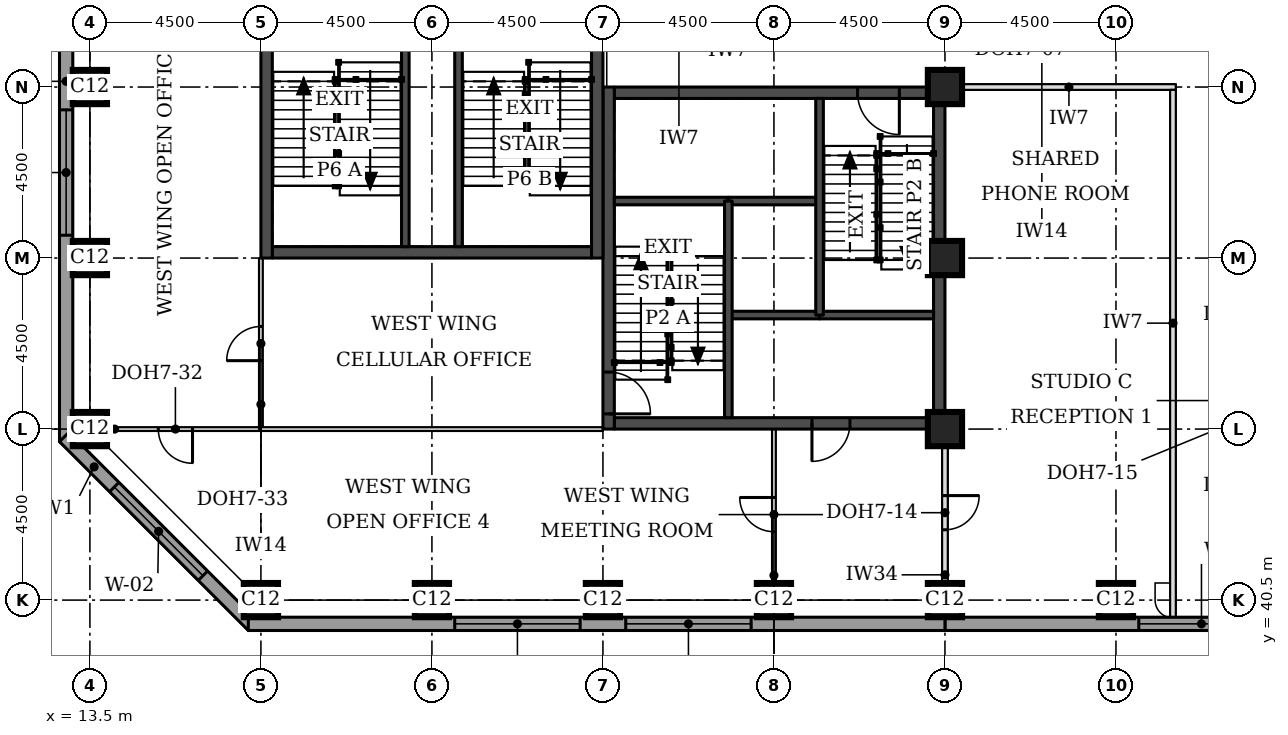
"""IFC4 building model, lengths in metres.
Left out: names, types, materials, properties, quantities, classifications, styles, units other than length and angle.
Written with IfcOpenShell. Run it as: python <this file> out.ifc"""

import sys

from ifc_helpers import new_model, si_unit, direction, frame, frame_2d, origin, origin_2d, place, context, subcontext, project, spatial, rectangle, extrude, element, fill, save


model = new_model("IFC4")
c1 = context("Model", 3, precision=1e-05, world=origin(), true_north=direction((0.0, 1.0)))
c2 = subcontext(c1, "Body", "Model", "MODEL_VIEW")
j1 = project(units=[si_unit("LENGTHUNIT", "METRE"), si_unit("PLANEANGLEUNIT", "RADIAN")], contexts=[c1])
p1 = place(None, origin())
s1 = spatial("IfcSite", under=j1, at=p1, CompositionType="ELEMENT")
p2 = place(p1, origin())
s2 = spatial("IfcBuilding", under=s1, at=p2, CompositionType="ELEMENT")
p3 = place(p2, frame((0.0, 0.0, 192.1)))
s3 = spatial("IfcBuildingStorey", under=s2, at=p3, CompositionType="ELEMENT", Elevation=192.1)
for number, where, z_axis, x_axis in (
    (1, (18.0, 40.5, 0.0), (0.0, 0.0, 1.0), (1.0, 0.0, 0.0)),
    (2, (22.5, 40.5, 0.0), (0.0, 0.0, 1.0), (1.0, 0.0, 0.0)),
    (3, (27.0, 40.5, 0.0), (0.0, 0.0, 1.0), (1.0, 0.0, 0.0)),
    (4, (31.5, 40.5, 0.0), (0.0, 0.0, 1.0), (1.0, 0.0, 0.0)),
    (5, (36.0, 40.5, 0.0), (0.0, 0.0, 1.0), (1.0, 0.0, 0.0)),
    (6, (40.5, 40.5, 0.0), (0.0, 0.0, 1.0), (1.0, 0.0, 0.0)),
    (7, (13.5, 45.0, 0.0), (0.0, 0.0, 1.0), (1.0, 0.0, 0.0)),
    (8, (36.0, 45.0, 0.0), (0.0, 0.0, 1.0), (1.0, 0.0, 0.0)),
    (9, (13.5, 49.5, 0.0), (0.0, 0.0, 1.0), (1.0, 0.0, 0.0)),
    (10, (36.0, 49.5, 0.0), (0.0, 0.0, 1.0), (1.0, 0.0, 0.0)),
    (11, (13.5, 54.0, 0.0), (0.0, 0.0, 1.0), (1.0, 0.0, 0.0)),
    (12, (36.0, 54.0, 0.0), (0.0, 0.0, 1.0), (1.0, 0.0, 0.0)),
):
    element("IfcColumn", number, at=place(p3, frame(where, z_axis=z_axis, x_axis=x_axis)), inside=s3, PredefinedType="COLUMN", context=c2, shape_type="SweptSolid", body=[
        extrude(rectangle(XDim=0.9, YDim=0.9, at=origin_2d()), origin(), (0.0, 0.0, 1.0), 3.7),
    ])
p4 = place(p3, frame((27.3, 45.15, 0.0), z_axis=(0.0, 0.0, 1.0), x_axis=(1.0, 0.0, 0.0)))
e13 = element("IfcWall", 13, at=p4, inside=s3, PredefinedType="SHEAR", context=c2, shape_type="SweptSolid", body=[
    extrude(rectangle(XDim=8.4, YDim=0.3, at=frame_2d((4.2, 0.0))), origin(), (0.0, 0.0, 1.0), 3.7),
])
p5 = place(p4, frame((5.2, 0.0, 0.0)))
e14 = element("IfcOpeningElement", 14, at=p5, cuts=e13, PredefinedType="OPENING", context=c2, shape_type="SweptSolid", body=[
    extrude(rectangle(XDim=1.0, YDim=2.1, at=frame_2d((0.5, 1.05))), frame((0.0, 0.16, 0.0), z_axis=(0.0, -1.0, 0.0), x_axis=(1.0, 0.0, 0.0)), (0.0, 0.0, 1.0), 0.32),
])
p6 = place(p3, frame((27.3, 53.85, 0.0), z_axis=(0.0, 0.0, 1.0), x_axis=(1.0, 0.0, 0.0)))
e15 = element("IfcWall", 15, at=p6, inside=s3, PredefinedType="SHEAR", context=c2, shape_type="SweptSolid", body=[
    extrude(rectangle(XDim=8.4, YDim=0.3, at=frame_2d((4.2, 0.0))), origin(), (0.0, 0.0, 1.0), 3.7),
])
p7 = place(p6, frame((6.4, 0.0, 0.0)))
e16 = element("IfcOpeningElement", 16, at=p7, cuts=e15, PredefinedType="OPENING", context=c2, shape_type="SweptSolid", body=[
    extrude(rectangle(XDim=1.1, YDim=2.1, at=frame_2d((0.55, 1.05))), frame((0.0, 0.16, 0.0), z_axis=(0.0, -1.0, 0.0), x_axis=(1.0, 0.0, 0.0)), (0.0, 0.0, 1.0), 0.32),
])
p8 = place(p3, frame((27.15, 45.0, 0.0), z_axis=(0.0, 0.0, 1.0), x_axis=(0.0, 1.0, 0.0)))
e17 = element("IfcWall", 17, at=p8, inside=s3, PredefinedType="SHEAR", context=c2, shape_type="SweptSolid", body=[
    extrude(rectangle(XDim=9.0, YDim=0.3, at=frame_2d((4.5, 0.0))), origin(), (0.0, 0.0, 1.0), 3.7),
])
p9 = place(p8, frame((0.4, 0.0, 0.0)))
e18 = element("IfcOpeningElement", 18, at=p9, cuts=e17, PredefinedType="OPENING", context=c2, shape_type="SweptSolid", body=[
    extrude(rectangle(XDim=1.1, YDim=2.1, at=frame_2d((0.55, 1.05))), frame((0.0, 0.16, 0.0), z_axis=(0.0, -1.0, 0.0), x_axis=(1.0, 0.0, 0.0)), (0.0, 0.0, 1.0), 0.32),
])
p10 = place(p3, frame((35.85, 45.0, 0.0), z_axis=(0.0, 0.0, 1.0), x_axis=(0.0, 1.0, 0.0)))
e19 = element("IfcWall", 19, at=p10, inside=s3, PredefinedType="SHEAR", context=c2, shape_type="SweptSolid", body=[
    extrude(rectangle(XDim=9.0, YDim=0.3, at=frame_2d((4.5, 0.0))), origin(), (0.0, 0.0, 1.0), 3.7),
])
p11 = place(p3, frame((18.3, 49.65, 0.0), z_axis=(0.0, 0.0, 1.0), x_axis=(1.0, 0.0, 0.0)))
e20 = element("IfcWall", 20, at=p11, inside=s3, PredefinedType="SHEAR", context=c2, shape_type="SweptSolid", body=[
    extrude(rectangle(XDim=8.4, YDim=0.3, at=frame_2d((4.2, 0.0))), origin(), (0.0, 0.0, 1.0), 3.7),
])
p12 = place(p3, frame((18.15, 49.5, 0.0), z_axis=(0.0, 0.0, 1.0), x_axis=(0.0, 1.0, 0.0)))
e21 = element("IfcWall", 21, at=p12, inside=s3, PredefinedType="SHEAR", context=c2, shape_type="SweptSolid", body=[
    extrude(rectangle(XDim=9.0, YDim=0.3, at=frame_2d((4.5, 0.0))), origin(), (0.0, 0.0, 1.0), 3.7),
])
p13 = place(p3, frame((26.85, 49.5, 0.0), z_axis=(0.0, 0.0, 1.0), x_axis=(0.0, 1.0, 0.0)))
e22 = element("IfcWall", 22, at=p13, inside=s3, PredefinedType="SHEAR", context=c2, shape_type="SweptSolid", body=[
    extrude(rectangle(XDim=9.0, YDim=0.3, at=frame_2d((4.5, 0.0))), origin(), (0.0, 0.0, 1.0), 3.7),
])
p14 = place(p13, frame((6.6, 0.0, 0.0)))
e23 = element("IfcOpeningElement", 23, at=p14, cuts=e22, PredefinedType="OPENING", context=c2, shape_type="SweptSolid", body=[
    extrude(rectangle(XDim=1.8, YDim=2.1, at=frame_2d((0.9, 1.05))), frame((0.0, 0.16, 0.0), z_axis=(0.0, -1.0, 0.0), x_axis=(1.0, 0.0, 0.0)), (0.0, 0.0, 1.0), 0.32),
])
p15 = place(p3, frame((36.0, 39.875, 0.0), z_axis=(0.0, 0.0, 1.0), x_axis=(1.0, 0.0, 0.0)))
e24 = element("IfcWall", 24, at=p15, inside=s3, PredefinedType="STANDARD", context=c2, shape_type="SweptSolid", body=[
    extrude(rectangle(XDim=36.331, YDim=0.35, at=frame_2d((18.166, 0.0))), origin(), (0.0, 0.0, 1.0), 3.525),
])
p16 = place(p15, frame((5.1, 0.0, 0.9)))
e25 = element("IfcOpeningElement", 25, at=p16, cuts=e24, PredefinedType="OPENING", context=c2, shape_type="SweptSolid", body=[
    extrude(rectangle(XDim=3.3, YDim=1.9, at=frame_2d((1.65, 0.95))), frame((0.0, 0.185, 0.0), z_axis=(0.0, -1.0, 0.0), x_axis=(1.0, 0.0, 0.0)), (0.0, 0.0, 1.0), 0.37),
])
p17 = place(p15, frame((9.6, 0.0, 0.9)))
e26 = element("IfcOpeningElement", 26, at=p17, cuts=e24, PredefinedType="OPENING", context=c2, shape_type="SweptSolid", body=[
    extrude(rectangle(XDim=3.3, YDim=1.9, at=frame_2d((1.65, 0.95))), frame((0.0, 0.185, 0.0), z_axis=(0.0, -1.0, 0.0), x_axis=(1.0, 0.0, 0.0)), (0.0, 0.0, 1.0), 0.37),
])
p18 = place(p15, frame((14.1, 0.0, 0.9)))
e27 = element("IfcOpeningElement", 27, at=p18, cuts=e24, PredefinedType="OPENING", context=c2, shape_type="SweptSolid", body=[
    extrude(rectangle(XDim=3.3, YDim=1.9, at=frame_2d((1.65, 0.95))), frame((0.0, 0.185, 0.0), z_axis=(0.0, -1.0, 0.0), x_axis=(1.0, 0.0, 0.0)), (0.0, 0.0, 1.0), 0.37),
])
p19 = place(p15, frame((18.6, 0.0, 0.9)))
e28 = element("IfcOpeningElement", 28, at=p19, cuts=e24, PredefinedType="OPENING", context=c2, shape_type="SweptSolid", body=[
    extrude(rectangle(XDim=3.3, YDim=1.9, at=frame_2d((1.65, 0.95))), frame((0.0, 0.185, 0.0), z_axis=(0.0, -1.0, 0.0), x_axis=(1.0, 0.0, 0.0)), (0.0, 0.0, 1.0), 0.37),
])
p20 = place(p15, frame((23.1, 0.0, 0.9)))
e29 = element("IfcOpeningElement", 29, at=p20, cuts=e24, PredefinedType="OPENING", context=c2, shape_type="SweptSolid", body=[
    extrude(rectangle(XDim=3.3, YDim=1.9, at=frame_2d((1.65, 0.95))), frame((0.0, 0.185, 0.0), z_axis=(0.0, -1.0, 0.0), x_axis=(1.0, 0.0, 0.0)), (0.0, 0.0, 1.0), 0.37),
])
p21 = place(p15, frame((27.6, 0.0, 0.9)))
e30 = element("IfcOpeningElement", 30, at=p21, cuts=e24, PredefinedType="OPENING", context=c2, shape_type="SweptSolid", body=[
    extrude(rectangle(XDim=3.3, YDim=1.9, at=frame_2d((1.65, 0.95))), frame((0.0, 0.185, 0.0), z_axis=(0.0, -1.0, 0.0), x_axis=(1.0, 0.0, 0.0)), (0.0, 0.0, 1.0), 0.37),
])
p22 = place(p3, frame((12.875, 58.831, 0.0), z_axis=(0.0, 0.0, 1.0), x_axis=(0.0, -1.0, 0.0)))
e31 = element("IfcWall", 31, at=p22, inside=s3, PredefinedType="STANDARD", context=c2, shape_type="SweptSolid", body=[
    extrude(rectangle(XDim=14.163, YDim=0.35, at=frame_2d((7.081, 0.0))), origin(), (0.0, 0.0, 1.0), 3.525),
])
p23 = place(p22, frame((5.431, 0.0, 0.9)))
e32 = element("IfcOpeningElement", 32, at=p23, cuts=e31, PredefinedType="OPENING", context=c2, shape_type="SweptSolid", body=[
    extrude(rectangle(XDim=3.3, YDim=1.9, at=frame_2d((1.65, 0.95))), frame((0.0, 0.185, 0.0), z_axis=(0.0, -1.0, 0.0), x_axis=(1.0, 0.0, 0.0)), (0.0, 0.0, 1.0), 0.37),
])
p24 = place(p3, frame((12.824, 44.792, 0.0), z_axis=(0.0, 0.0, 1.0), x_axis=(0.707106781187, -0.707106781187, 0.0)))
e33 = element("IfcWall", 33, at=p24, inside=s3, PredefinedType="STANDARD", context=c2, shape_type="SweptSolid", body=[
    extrude(rectangle(XDim=7.027, YDim=0.35, at=frame_2d((3.513, 0.0))), origin(), (0.0, 0.0, 1.0), 3.525),
])
p25 = place(p24, frame((1.863, 0.0, 0.9)))
e34 = element("IfcOpeningElement", 34, at=p25, cuts=e33, PredefinedType="OPENING", context=c2, shape_type="SweptSolid", body=[
    extrude(rectangle(XDim=3.3, YDim=1.9, at=frame_2d((1.65, 0.95))), frame((0.0, 0.185, 0.0), z_axis=(0.0, -1.0, 0.0), x_axis=(1.0, 0.0, 0.0)), (0.0, 0.0, 1.0), 0.37),
])
p26 = place(p3, frame((17.669, 39.875, 0.0), z_axis=(0.0, 0.0, 1.0), x_axis=(1.0, 0.0, 0.0)))
e35 = element("IfcWall", 35, at=p26, inside=s3, PredefinedType="STANDARD", context=c2, shape_type="SweptSolid", body=[
    extrude(rectangle(XDim=18.331, YDim=0.35, at=frame_2d((9.166, 0.0))), origin(), (0.0, 0.0, 1.0), 3.525),
])
p27 = place(p26, frame((5.431, 0.0, 0.9)))
e36 = element("IfcOpeningElement", 36, at=p27, cuts=e35, PredefinedType="OPENING", context=c2, shape_type="SweptSolid", body=[
    extrude(rectangle(XDim=3.3, YDim=1.9, at=frame_2d((1.65, 0.95))), frame((0.0, 0.185, 0.0), z_axis=(0.0, -1.0, 0.0), x_axis=(1.0, 0.0, 0.0)), (0.0, 0.0, 1.0), 0.37),
])
p28 = place(p26, frame((9.931, 0.0, 0.9)))
e37 = element("IfcOpeningElement", 37, at=p28, cuts=e35, PredefinedType="OPENING", context=c2, shape_type="SweptSolid", body=[
    extrude(rectangle(XDim=3.3, YDim=1.9, at=frame_2d((1.65, 0.95))), frame((0.0, 0.185, 0.0), z_axis=(0.0, -1.0, 0.0), x_axis=(1.0, 0.0, 0.0)), (0.0, 0.0, 1.0), 0.37),
])
p29 = place(p3, frame((36.45, 54.0, 0.0), z_axis=(0.0, 0.0, 1.0), x_axis=(1.0, 0.0, 0.0)))
e38 = element("IfcWall", 38, at=p29, inside=s3, PredefinedType="PARTITIONING", context=c2, shape_type="SweptSolid", body=[
    extrude(rectangle(XDim=5.625, YDim=0.15, at=frame_2d((2.812, 0.0))), origin(), (0.0, 0.0, 1.0), 3.55),
])
p30 = place(p3, frame((42.0, 40.05, 0.0), z_axis=(0.0, 0.0, 1.0), x_axis=(0.0, 1.0, 0.0)))
e39 = element("IfcWall", 39, at=p30, inside=s3, PredefinedType="PARTITIONING", context=c2, shape_type="SweptSolid", body=[
    extrude(rectangle(XDim=13.875, YDim=0.15, at=frame_2d((6.938, 0.0))), origin(), (0.0, 0.0, 1.0), 3.55),
])
p31 = place(p3, frame((36.0, 40.95, 0.0), z_axis=(0.0, 0.0, 1.0), x_axis=(0.0, 1.0, 0.0)))
e40 = element("IfcWall", 40, at=p31, inside=s3, PredefinedType="PARTITIONING", context=c2, shape_type="SweptSolid", body=[
    extrude(rectangle(XDim=3.63, YDim=0.15, at=frame_2d((1.815, 0.0))), origin(), (0.0, 0.0, 1.0), 2.8),
])
p32 = place(p31, frame((1.4, 0.0, 0.0)))
e41 = element("IfcOpeningElement", 41, at=p32, cuts=e40, PredefinedType="OPENING", context=c2, shape_type="SweptSolid", body=[
    extrude(rectangle(XDim=0.9, YDim=2.1, at=frame_2d((0.45, 1.05))), frame((0.0, 0.085, 0.0), z_axis=(0.0, -1.0, 0.0), x_axis=(1.0, 0.0, 0.0)), (0.0, 0.0, 1.0), 0.17),
])
p33 = place(p3, frame((18.0, 45.0, 0.0), z_axis=(0.0, 0.0, 1.0), x_axis=(-1.0, 0.0, 0.0)))
e42 = element("IfcWall", 42, at=p33, inside=s3, PredefinedType="PARTITIONING", context=c2, shape_type="SweptSolid", body=[
    extrude(rectangle(XDim=4.5, YDim=0.1, at=frame_2d((2.25, 0.0))), origin(), (0.0, 0.0, 1.0), 2.55),
])
p34 = place(p33, frame((1.8, 0.0, 0.0)))
e43 = element("IfcOpeningElement", 43, at=p34, cuts=e42, PredefinedType="OPENING", context=c2, shape_type="SweptSolid", body=[
    extrude(rectangle(XDim=0.9, YDim=2.1, at=frame_2d((0.45, 1.05))), frame((0.0, 0.06, 0.0), z_axis=(0.0, -1.0, 0.0), x_axis=(1.0, 0.0, 0.0)), (0.0, 0.0, 1.0), 0.12),
])
p35 = place(p3, frame((18.0, 49.5, 0.0), z_axis=(0.0, 0.0, 1.0), x_axis=(0.0, -1.0, 0.0)))
e44 = element("IfcWall", 44, at=p35, inside=s3, PredefinedType="PARTITIONING", context=c2, shape_type="SweptSolid", body=[
    extrude(rectangle(XDim=4.5, YDim=0.1, at=frame_2d((2.25, 0.0))), origin(), (0.0, 0.0, 1.0), 3.55),
])
p36 = place(p35, frame((1.8, 0.0, 0.0)))
e45 = element("IfcOpeningElement", 45, at=p36, cuts=e44, PredefinedType="OPENING", context=c2, shape_type="SweptSolid", body=[
    extrude(rectangle(XDim=0.9, YDim=2.1, at=frame_2d((0.45, 1.05))), frame((0.0, 0.06, 0.0), z_axis=(0.0, -1.0, 0.0), x_axis=(1.0, 0.0, 0.0)), (0.0, 0.0, 1.0), 0.12),
])
p37 = place(p3, frame((18.0, 45.0, 0.0), z_axis=(0.0, 0.0, 1.0), x_axis=(1.0, 0.0, 0.0)))
e46 = element("IfcWall", 46, at=p37, inside=s3, PredefinedType="PARTITIONING", context=c2, shape_type="SweptSolid", body=[
    extrude(rectangle(XDim=9.0, YDim=0.1, at=frame_2d((4.5, 0.0))), origin(), (0.0, 0.0, 1.0), 2.55),
])
p38 = place(p3, frame((31.5, 45.0, 0.0), z_axis=(0.0, 0.0, 1.0), x_axis=(0.0, -1.0, 0.0)))
e47 = element("IfcWall", 47, at=p38, inside=s3, PredefinedType="PARTITIONING", context=c2, shape_type="SweptSolid", body=[
    extrude(rectangle(XDim=4.5, YDim=0.1, at=frame_2d((2.25, 0.0))), origin(), (0.0, 0.0, 1.0), 3.55),
])
p39 = place(p38, frame((1.8, 0.0, 0.0)))
e48 = element("IfcOpeningElement", 48, at=p39, cuts=e47, PredefinedType="OPENING", context=c2, shape_type="SweptSolid", body=[
    extrude(rectangle(XDim=0.9, YDim=2.1, at=frame_2d((0.45, 1.05))), frame((0.0, 0.06, 0.0), z_axis=(0.0, -1.0, 0.0), x_axis=(1.0, 0.0, 0.0)), (0.0, 0.0, 1.0), 0.12),
])
p40 = place(p3, frame((30.3, 48.0, 0.0), z_axis=(0.0, 0.0, 1.0), x_axis=(1.0, 0.0, 0.0)))
e49 = element("IfcWall", 49, at=p40, inside=s3, PredefinedType="SOLIDWALL", context=c2, shape_type="SweptSolid", body=[
    extrude(rectangle(XDim=2.4, YDim=0.2, at=frame_2d((1.2, 0.0))), origin(), (0.0, 0.0, 1.0), 3.55),
])
p41 = place(p3, frame((32.7, 48.0, 0.0), z_axis=(0.0, 0.0, 1.0), x_axis=(1.0, 0.0, 0.0)))
e50 = element("IfcWall", 50, at=p41, inside=s3, PredefinedType="SOLIDWALL", context=c2, shape_type="SweptSolid", body=[
    extrude(rectangle(XDim=3.0, YDim=0.2, at=frame_2d((1.5, 0.0))), origin(), (0.0, 0.0, 1.0), 3.55),
])
p42 = place(p3, frame((30.3, 51.0, 0.0), z_axis=(0.0, 0.0, 1.0), x_axis=(1.0, 0.0, 0.0)))
e51 = element("IfcWall", 51, at=p42, inside=s3, PredefinedType="SOLIDWALL", context=c2, shape_type="SweptSolid", body=[
    extrude(rectangle(XDim=2.4, YDim=0.2, at=frame_2d((1.2, 0.0))), origin(), (0.0, 0.0, 1.0), 3.7),
])
p43 = place(p3, frame((27.3, 51.0, 0.0), z_axis=(0.0, 0.0, 1.0), x_axis=(1.0, 0.0, 0.0)))
e52 = element("IfcWall", 52, at=p43, inside=s3, PredefinedType="SOLIDWALL", context=c2, shape_type="SweptSolid", body=[
    extrude(rectangle(XDim=3.0, YDim=0.2, at=frame_2d((1.5, 0.0))), origin(), (0.0, 0.0, 1.0), 3.55),
])
for number, where, z_axis, x_axis in (
    (53, (30.3, 45.3, 0.0), (0.0, 0.0, 1.0), (0.0, 1.0, 0.0)),
    (54, (32.7, 48.0, 0.0), (0.0, 0.0, 1.0), (0.0, 1.0, 0.0)),
):
    element("IfcWall", number, at=place(p3, frame(where, z_axis=z_axis, x_axis=x_axis)), inside=s3, PredefinedType="SOLIDWALL", context=c2, shape_type="SweptSolid", body=[
        extrude(rectangle(XDim=5.7, YDim=0.2, at=frame_2d((2.85, 0.0))), origin(), (0.0, 0.0, 1.0), 3.55),
    ])
for number, where, z_axis, x_axis in (
    (55, (21.8, 49.8, 0.0), (0.0, 0.0, 1.0), (0.0, 1.0, 0.0)),
    (56, (23.2, 49.8, 0.0), (0.0, 0.0, 1.0), (0.0, 1.0, 0.0)),
):
    element("IfcWall", number, at=place(p3, frame(where, z_axis=z_axis, x_axis=x_axis)), inside=s3, PredefinedType="SOLIDWALL", context=c2, shape_type="SweptSolid", body=[
        extrude(rectangle(XDim=6.05, YDim=0.2, at=frame_2d((3.025, 0.0))), origin(), (0.0, 0.0, 1.0), 3.55),
    ])
p44 = place(p16, origin())
e57 = element("IfcWindow", 57, at=p44, inside=s3, PartitioningType="SINGLE_PANEL", PredefinedType="WINDOW", context=c2, shape_type="SweptSolid", body=[
    extrude(rectangle(XDim=3.3, YDim=1.9, at=frame_2d((1.65, 0.95))), frame((0.0, 0.085, 0.0), z_axis=(0.0, -1.0, 0.0), x_axis=(1.0, 0.0, 0.0)), (0.0, 0.0, 1.0), 0.06),
])
fill(e25, e57)
p45 = place(p23, origin())
e58 = element("IfcWindow", 58, at=p45, inside=s3, PartitioningType="SINGLE_PANEL", PredefinedType="WINDOW", context=c2, shape_type="SweptSolid", body=[
    extrude(rectangle(XDim=3.3, YDim=1.9, at=frame_2d((1.65, 0.95))), frame((0.0, 0.085, 0.0), z_axis=(0.0, -1.0, 0.0), x_axis=(1.0, 0.0, 0.0)), (0.0, 0.0, 1.0), 0.06),
])
fill(e32, e58)
p46 = place(p25, origin())
e59 = element("IfcWindow", 59, at=p46, inside=s3, PartitioningType="SINGLE_PANEL", PredefinedType="WINDOW", context=c2, shape_type="SweptSolid", body=[
    extrude(rectangle(XDim=3.3, YDim=1.9, at=frame_2d((1.65, 0.95))), frame((0.0, 0.085, 0.0), z_axis=(0.0, -1.0, 0.0), x_axis=(1.0, 0.0, 0.0)), (0.0, 0.0, 1.0), 0.06),
])
fill(e34, e59)
p47 = place(p27, origin())
e60 = element("IfcWindow", 60, at=p47, inside=s3, PartitioningType="SINGLE_PANEL", PredefinedType="WINDOW", context=c2, shape_type="SweptSolid", body=[
    extrude(rectangle(XDim=3.3, YDim=1.9, at=frame_2d((1.65, 0.95))), frame((0.0, 0.085, 0.0), z_axis=(0.0, -1.0, 0.0), x_axis=(1.0, 0.0, 0.0)), (0.0, 0.0, 1.0), 0.06),
])
fill(e36, e60)
p48 = place(p28, origin())
e61 = element("IfcWindow", 61, at=p48, inside=s3, PartitioningType="SINGLE_PANEL", PredefinedType="WINDOW", context=c2, shape_type="SweptSolid", body=[
    extrude(rectangle(XDim=3.3, YDim=1.9, at=frame_2d((1.65, 0.95))), frame((0.0, 0.085, 0.0), z_axis=(0.0, -1.0, 0.0), x_axis=(1.0, 0.0, 0.0)), (0.0, 0.0, 1.0), 0.06),
])
fill(e37, e61)
p49 = place(p32, frame((0.9, 0.0, 0.0), z_axis=(0.0, 0.0, 1.0), x_axis=(-1.0, 0.0, 0.0)))
e62 = element("IfcDoor", 62, at=p49, inside=s3, OperationType="SINGLE_SWING_LEFT", PredefinedType="DOOR", context=c2, shape_type="SweptSolid", body=[
    extrude(rectangle(XDim=0.9, YDim=2.1, at=frame_2d((0.45, 1.05))), frame((0.0, 0.025, 0.0), z_axis=(0.0, -1.0, 0.0), x_axis=(1.0, 0.0, 0.0)), (0.0, 0.0, 1.0), 0.05),
])
fill(e41, e62)
p50 = place(p34, origin())
e63 = element("IfcDoor", 63, at=p50, inside=s3, OperationType="SINGLE_SWING_LEFT", PredefinedType="DOOR", context=c2, shape_type="SweptSolid", body=[
    extrude(rectangle(XDim=0.9, YDim=2.1, at=frame_2d((0.45, 1.05))), frame((0.0, 0.025, 0.0), z_axis=(0.0, -1.0, 0.0), x_axis=(1.0, 0.0, 0.0)), (0.0, 0.0, 1.0), 0.05),
])
fill(e43, e63)
p51 = place(p36, frame((0.9, 0.0, 0.0), z_axis=(0.0, 0.0, 1.0), x_axis=(-1.0, 0.0, 0.0)))
e64 = element("IfcDoor", 64, at=p51, inside=s3, OperationType="SINGLE_SWING_LEFT", PredefinedType="DOOR", context=c2, shape_type="SweptSolid", body=[
    extrude(rectangle(XDim=0.9, YDim=2.1, at=frame_2d((0.45, 1.05))), frame((0.0, 0.025, 0.0), z_axis=(0.0, -1.0, 0.0), x_axis=(1.0, 0.0, 0.0)), (0.0, 0.0, 1.0), 0.05),
])
fill(e45, e64)
p52 = place(p39, frame((0.9, 0.0, 0.0), z_axis=(0.0, 0.0, 1.0), x_axis=(-1.0, 0.0, 0.0)))
e65 = element("IfcDoor", 65, at=p52, inside=s3, OperationType="SINGLE_SWING_RIGHT", PredefinedType="DOOR", context=c2, shape_type="SweptSolid", body=[
    extrude(rectangle(XDim=0.9, YDim=2.1, at=frame_2d((0.45, 1.05))), frame((0.0, 0.025, 0.0), z_axis=(0.0, -1.0, 0.0), x_axis=(1.0, 0.0, 0.0)), (0.0, 0.0, 1.0), 0.05),
])
fill(e48, e65)
p53 = place(p9, frame((1.1, 0.0, 0.0), z_axis=(0.0, 0.0, 1.0), x_axis=(-1.0, 0.0, 0.0)))
e66 = element("IfcDoor", 66, at=p53, inside=s3, OperationType="SINGLE_SWING_RIGHT", PredefinedType="DOOR", context=c2, shape_type="SweptSolid", body=[
    extrude(rectangle(XDim=1.1, YDim=2.1, at=frame_2d((0.55, 1.05))), frame((0.0, 0.025, 0.0), z_axis=(0.0, -1.0, 0.0), x_axis=(1.0, 0.0, 0.0)), (0.0, 0.0, 1.0), 0.05),
])
fill(e18, e66)
p54 = place(p7, frame((1.1, 0.0, 0.0), z_axis=(0.0, 0.0, 1.0), x_axis=(-1.0, 0.0, 0.0)))
e67 = element("IfcDoor", 67, at=p54, inside=s3, OperationType="SINGLE_SWING_LEFT", PredefinedType="DOOR", context=c2, shape_type="SweptSolid", body=[
    extrude(rectangle(XDim=1.1, YDim=2.1, at=frame_2d((0.55, 1.05))), frame((0.0, 0.025, 0.0), z_axis=(0.0, -1.0, 0.0), x_axis=(1.0, 0.0, 0.0)), (0.0, 0.0, 1.0), 0.05),
])
fill(e16, e67)
p55 = place(p5, frame((1.0, 0.0, 0.0), z_axis=(0.0, 0.0, 1.0), x_axis=(-1.0, 0.0, 0.0)))
e68 = element("IfcDoor", 68, at=p55, inside=s3, OperationType="SINGLE_SWING_RIGHT", PredefinedType="DOOR", context=c2, shape_type="SweptSolid", body=[
    extrude(rectangle(XDim=1.0, YDim=2.1, at=frame_2d((0.5, 1.05))), frame((0.0, 0.025, 0.0), z_axis=(0.0, -1.0, 0.0), x_axis=(1.0, 0.0, 0.0)), (0.0, 0.0, 1.0), 0.05),
])
fill(e14, e68)
save(model, sys.argv[1])
